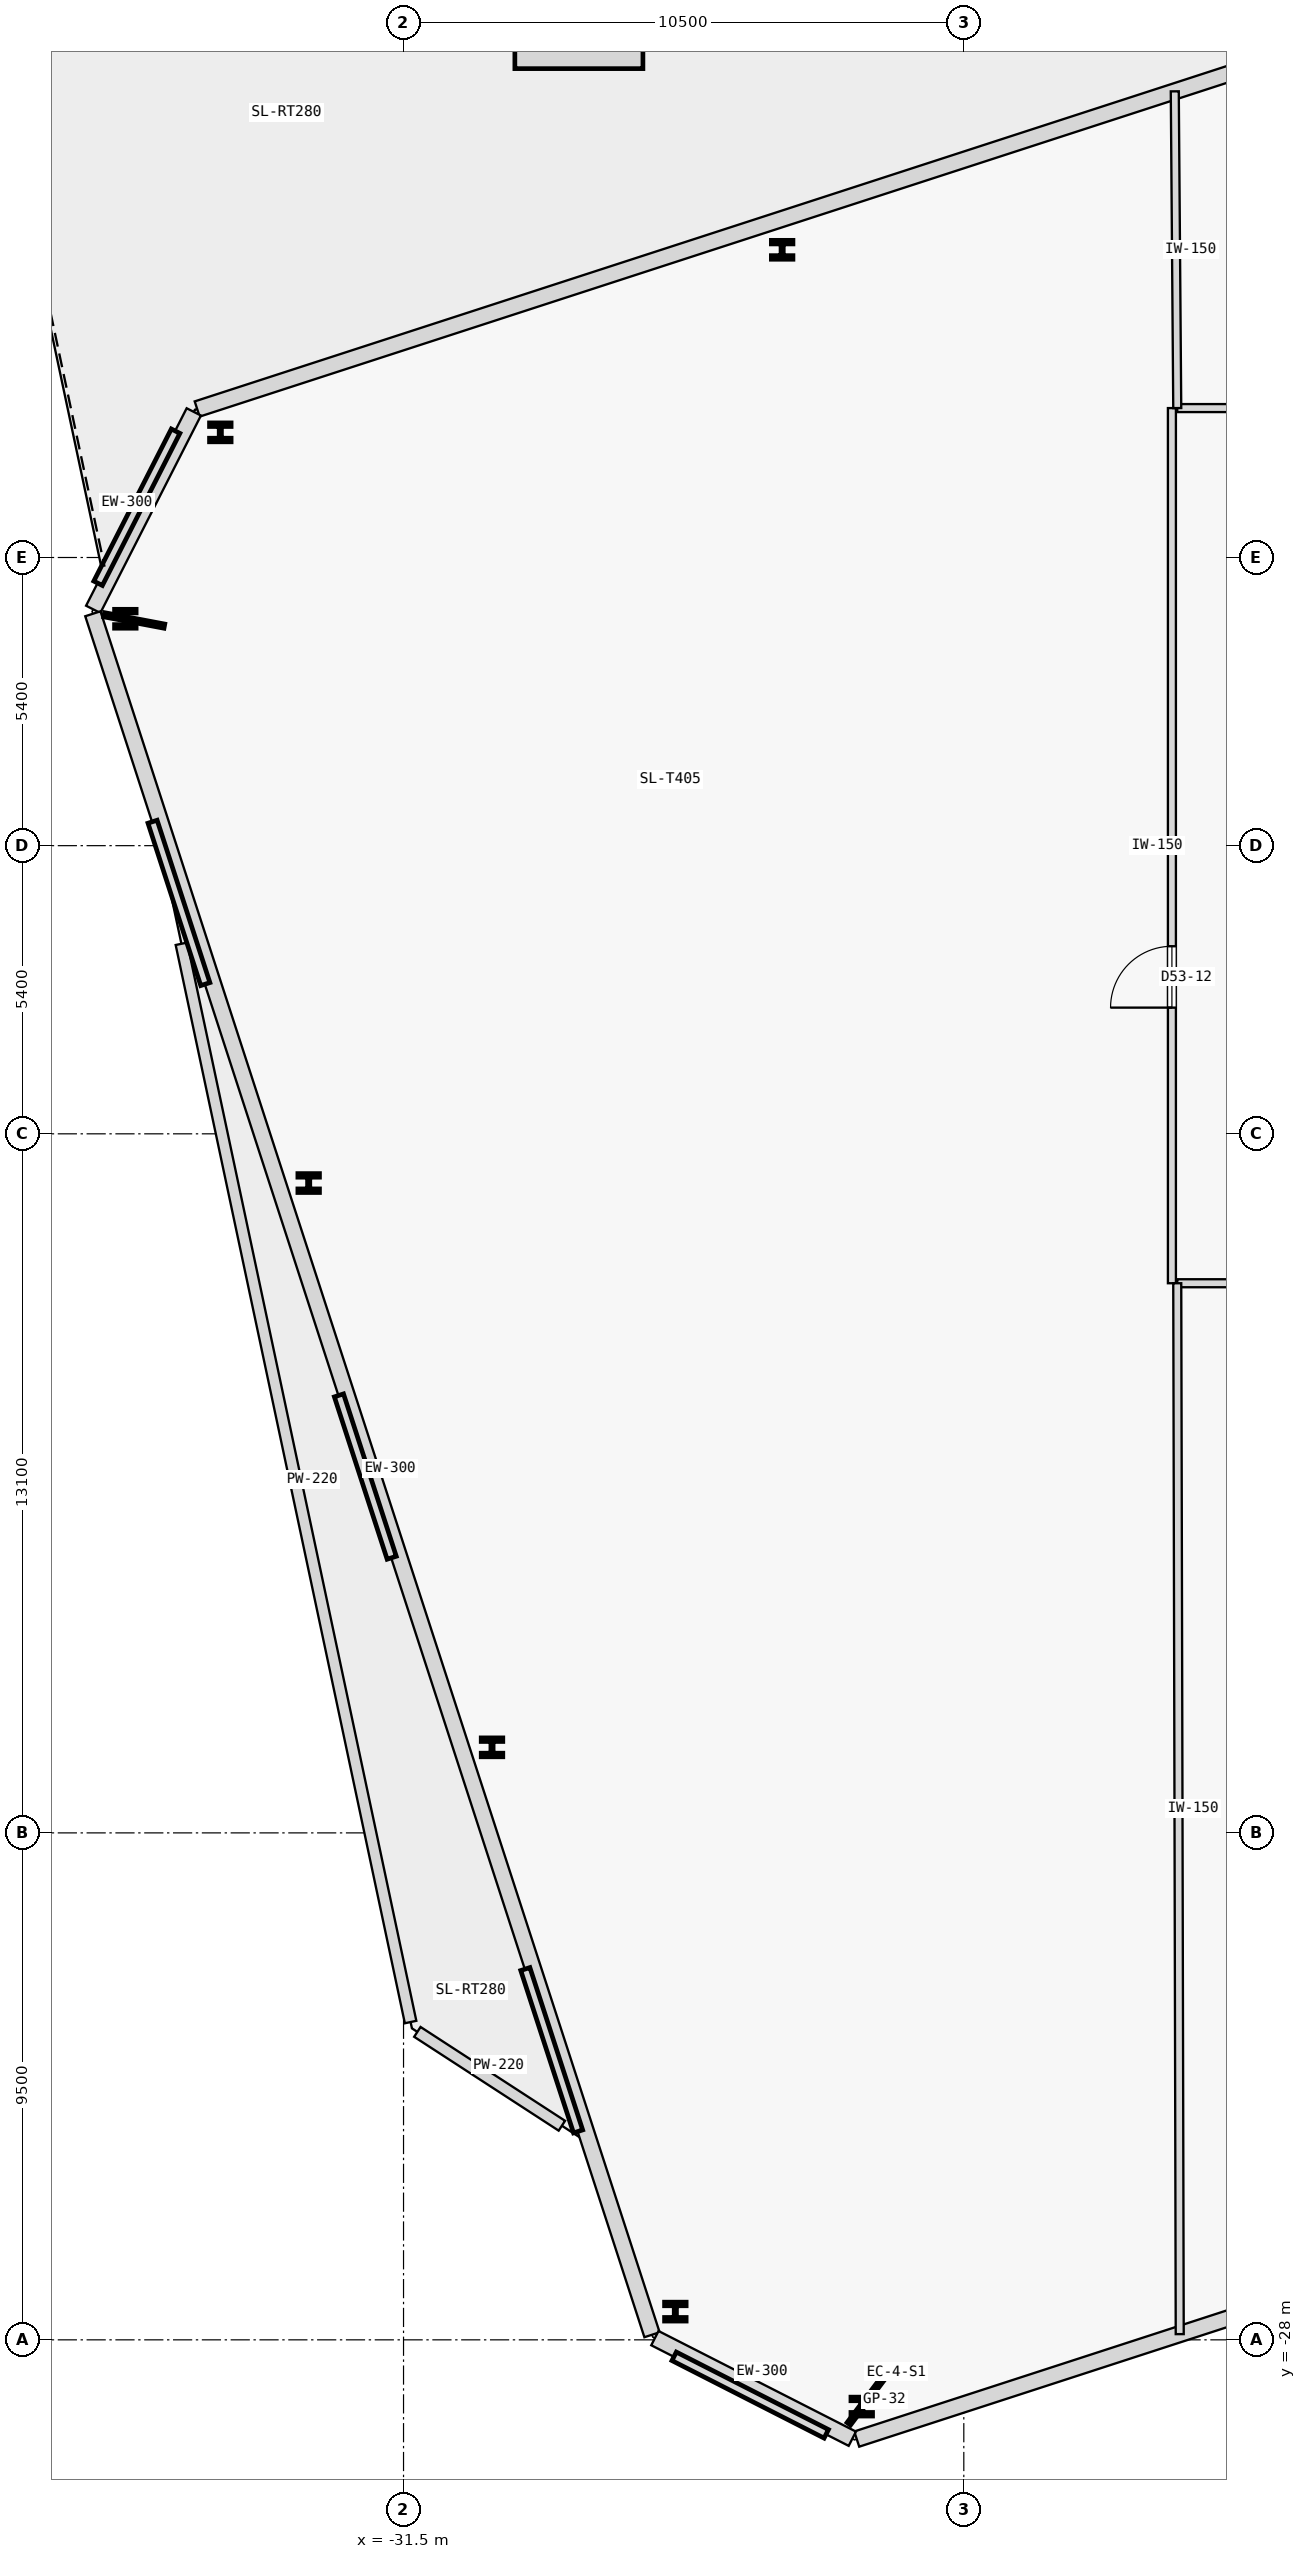
"""IFC4 building model, lengths in metres.
Left out: names, types, materials, properties, quantities, classifications, styles, units other than length and angle.
Written with IfcOpenShell. Run it as: python <this file> out.ifc"""

import sys

from ifc_helpers import new_model, si_unit, direction, frame, frame_2d, origin, origin_2d, place, context, subcontext, project, spatial, rectangle, i_section, extrude, element, fill, save


model = new_model("IFC4")
c1 = context("Model", 3, precision=1e-05, world=origin(), true_north=direction((0.0, 1.0)))
c2 = subcontext(c1, "Body", "Model", "MODEL_VIEW")
j1 = project(units=[si_unit("LENGTHUNIT", "METRE"), si_unit("PLANEANGLEUNIT", "RADIAN")], contexts=[c1])
p1 = place(None, origin())
s1 = spatial("IfcSite", under=j1, at=p1, CompositionType="ELEMENT")
p2 = place(p1, origin())
s2 = spatial("IfcBuilding", under=s1, at=p2, CompositionType="ELEMENT")
p3 = place(p2, frame((0.0, 0.0, 202.4)))
s3 = spatial("IfcBuildingStorey", under=s2, at=p3, CompositionType="ELEMENT", Elevation=202.4)
for number, where, z_axis, x_axis in (
    (1, (-22.913, -29.251, 0.0), (0.0, 0.0, 1.0), (1.0, 0.0, 0.0)),
    (2, (-24.404, 11.166, 0.0), (0.0, 0.0, 1.0), (1.0, 0.0, 0.0)),
    (3, (-34.934, 7.745, 0.0), (0.0, 0.0, 1.0), (1.0, 0.0, 0.0)),
    (4, (-36.713, 4.252, 0.0), (0.0, 0.0, 1.0), (1.0, 0.0, 0.0)),
    (5, (-33.278, -6.322, 0.0), (0.0, 0.0, 1.0), (1.0, 0.0, 0.0)),
    (6, (-29.842, -16.897, 0.0), (0.0, 0.0, 1.0), (1.0, 0.0, 0.0)),
    (7, (-26.406, -27.471, 0.0), (0.0, 0.0, 1.0), (1.0, 0.0, 0.0)),
):
    element("IfcColumn", number, at=place(p3, frame(where, z_axis=z_axis, x_axis=x_axis)), inside=s3, PredefinedType="COLUMN", context=c2, shape_type="SweptSolid", body=[
        extrude(i_section(OverallWidth=0.405, OverallDepth=0.355, WebThickness=0.042, FlangeThickness=0.068, FilletRadius=0.015, at=origin_2d()), origin(), (0.0, 0.0, 1.0), 4.4),
    ])
p4 = place(p3, frame((-35.663, -1.839, 0.0), z_axis=(0.0, 0.0, 1.0), x_axis=(0.207913740762, -0.978147165002, 0.0)))
e8 = element("IfcWall", 8, at=p4, inside=s3, PredefinedType="PARAPET", context=c2, shape_type="SweptSolid", body=[
    extrude(rectangle(XDim=20.657, YDim=0.22, at=frame_2d((10.329, 0.0))), origin(), (0.0, 0.0, 1.0), 1.2),
])
p5 = place(p3, frame((-31.241, -22.229, 0.0), z_axis=(0.0, 0.0, 1.0), x_axis=(0.838666369731, -0.544645499643, 0.0)))
e9 = element("IfcWall", 9, at=p5, inside=s3, PredefinedType="PARAPET", context=c2, shape_type="SweptSolid", body=[
    extrude(rectangle(XDim=3.229, YDim=0.22, at=frame_2d((1.615, 0.0))), origin(), (0.0, 0.0, 1.0), 1.2),
])
p6 = place(p3, frame((-23.006, -29.86, 0.0), z_axis=(0.0, 0.0, 1.0), x_axis=(0.951056336628, 0.309017547334, 0.0)))
e10 = element("IfcWall", 10, at=p6, inside=s3, PredefinedType="STANDARD", context=c2, shape_type="SweptSolid", body=[
    extrude(rectangle(XDim=55.91, YDim=0.3, at=frame_2d((27.955, 0.0))), origin(), (0.0, 0.0, 1.0), 4.15),
])
p7 = place(p3, frame((17.806, 25.46, 0.0), z_axis=(0.0, 0.0, 1.0), x_axis=(-0.951056753609, -0.309016263999, 0.0)))
e11 = element("IfcWall", 11, at=p7, inside=s3, PredefinedType="STANDARD", context=c2, shape_type="SweptSolid", body=[
    extrude(rectangle(XDim=55.91, YDim=0.3, at=frame_2d((27.955, 0.0))), origin(), (0.0, 0.0, 1.0), 4.15),
])
p8 = place(p7, frame((29.949, 0.0, 0.0)))
e12 = element("IfcOpeningElement", 12, at=p8, cuts=e11, PredefinedType="OPENING", context=c2, shape_type="SweptSolid", body=[
    extrude(rectangle(XDim=1.1, YDim=2.2, at=frame_2d((0.55, 1.1))), frame((0.0, 0.16, 0.0), z_axis=(0.0, -1.0, 0.0), x_axis=(1.0, 0.0, 0.0)), (0.0, 0.0, 1.0), 0.32),
])
p9 = place(p3, frame((-35.43, 8.129, 0.0), z_axis=(0.0, 0.0, 1.0), x_axis=(-0.453973337542, -0.891015268556, 0.0)))
e13 = element("IfcWall", 13, at=p9, inside=s3, PredefinedType="STANDARD", context=c2, shape_type="SweptSolid", body=[
    extrude(rectangle(XDim=4.153, YDim=0.3, at=frame_2d((2.076, 0.0))), origin(), (0.0, 0.0, 1.0), 4.15),
])
p10 = place(p3, frame((-37.322, 4.346, 0.0), z_axis=(0.0, 0.0, 1.0), x_axis=(0.309008906067, -0.951059144308, 0.0)))
e14 = element("IfcWall", 14, at=p10, inside=s3, PredefinedType="STANDARD", context=c2, shape_type="SweptSolid", body=[
    extrude(rectangle(XDim=33.91, YDim=0.3, at=frame_2d((16.955, 0.0))), origin(), (0.0, 0.0, 1.0), 4.15),
])
p11 = place(p3, frame((-26.789, -27.968, 0.0), z_axis=(0.0, 0.0, 1.0), x_axis=(0.891003151549, -0.453997118856, 0.0)))
e15 = element("IfcWall", 15, at=p11, inside=s3, PredefinedType="STANDARD", context=c2, shape_type="SweptSolid", body=[
    extrude(rectangle(XDim=4.153, YDim=0.3, at=frame_2d((2.076, 0.0))), origin(), (0.0, 0.0, 1.0), 4.15),
])
p12 = place(p3, frame((-17.0, 8.2, 0.0), z_axis=(0.0, 0.0, 1.0), x_axis=(1.0, 0.0, 0.0)))
e16 = element("IfcWall", 16, at=p12, inside=s3, PredefinedType="PARTITIONING", context=c2, shape_type="SweptSolid", body=[
    extrude(rectangle(XDim=18.0, YDim=0.15, at=frame_2d((9.0, 0.0))), origin(), (0.0, 0.0, 1.0), 4.15),
])
p13 = place(p12, frame((8.425, 0.0, 0.0)))
e17 = element("IfcOpeningElement", 17, at=p13, cuts=e16, PredefinedType="OPENING", context=c2, shape_type="SweptSolid", body=[
    extrude(rectangle(XDim=1.15, YDim=2.15, at=frame_2d((0.575, 1.075))), frame((0.0, 0.085, 0.0), z_axis=(0.0, -1.0, 0.0), x_axis=(1.0, 0.0, 0.0)), (0.0, 0.0, 1.0), 0.17),
])
p14 = place(p3, frame((-17.0, -8.2, 0.0), z_axis=(0.0, 0.0, 1.0), x_axis=(1.0, 0.0, 0.0)))
e18 = element("IfcWall", 18, at=p14, inside=s3, PredefinedType="PARTITIONING", context=c2, shape_type="SweptSolid", body=[
    extrude(rectangle(XDim=16.5, YDim=0.15, at=frame_2d((8.25, 0.0))), origin(), (0.0, 0.0, 1.0), 4.15),
])
p15 = place(p14, frame((7.675, 0.0, 0.0)))
e19 = element("IfcOpeningElement", 19, at=p15, cuts=e18, PredefinedType="OPENING", context=c2, shape_type="SweptSolid", body=[
    extrude(rectangle(XDim=1.15, YDim=2.15, at=frame_2d((0.575, 1.075))), frame((0.0, 0.085, 0.0), z_axis=(0.0, -1.0, 0.0), x_axis=(1.0, 0.0, 0.0)), (0.0, 0.0, 1.0), 0.17),
])
p16 = place(p3, frame((-17.1, -8.2, 0.0), z_axis=(0.0, 0.0, 1.0), x_axis=(0.0, 1.0, 0.0)))
e20 = element("IfcWall", 20, at=p16, inside=s3, PredefinedType="PARTITIONING", context=c2, shape_type="SweptSolid", body=[
    extrude(rectangle(XDim=16.4, YDim=0.15, at=frame_2d((8.2, 0.0))), origin(), (0.0, 0.0, 1.0), 4.15),
])
p17 = place(p16, frame((5.165, 0.0, 0.0)))
e21 = element("IfcOpeningElement", 21, at=p17, cuts=e20, PredefinedType="OPENING", context=c2, shape_type="SweptSolid", body=[
    extrude(rectangle(XDim=1.15, YDim=2.15, at=frame_2d((0.575, 1.075))), frame((0.0, 0.085, 0.0), z_axis=(0.0, -1.0, 0.0), x_axis=(1.0, 0.0, 0.0)), (0.0, 0.0, 1.0), 0.17),
])
p18 = place(p3, frame((-17.0, 8.2, 0.0), z_axis=(0.0, 0.0, 1.0), x_axis=(-0.007814832104, 0.999969463733, 0.0)))
e22 = element("IfcWall", 22, at=p18, inside=s3, PredefinedType="PARTITIONING", context=c2, shape_type="SweptSolid", body=[
    extrude(rectangle(XDim=5.936, YDim=0.15, at=frame_2d((2.968, 0.0))), origin(), (0.0, 0.0, 1.0), 4.15),
])
p19 = place(p3, frame((-16.954, -27.893, 0.0), z_axis=(0.0, 0.0, 1.0), x_axis=(-0.002355472434, 0.999997225871, 0.0)))
e23 = element("IfcWall", 23, at=p19, inside=s3, PredefinedType="PARTITIONING", context=c2, shape_type="SweptSolid", body=[
    extrude(rectangle(XDim=19.693, YDim=0.15, at=frame_2d((9.847, 0.0))), origin(), (0.0, 0.0, 1.0), 4.15),
])
p20 = place(p17, origin())
e24 = element("IfcDoor", 24, at=p20, inside=s3, OperationType="SINGLE_SWING_LEFT", PredefinedType="DOOR", context=c2, shape_type="SweptSolid", body=[
    extrude(rectangle(XDim=1.15, YDim=2.15, at=frame_2d((0.575, 1.075))), frame((0.0, 0.025, 0.0), z_axis=(0.0, -1.0, 0.0), x_axis=(1.0, 0.0, 0.0)), (0.0, 0.0, 1.0), 0.05),
])
fill(e21, e24)
save(model, sys.argv[1])
